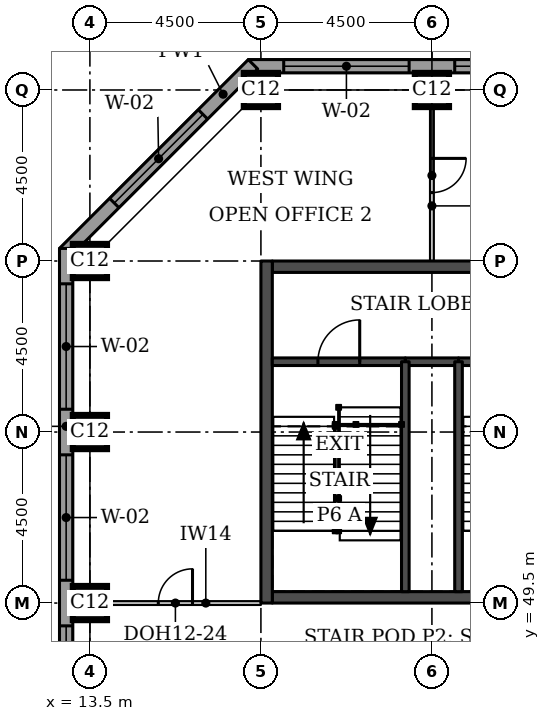
"""IFC4 building model, lengths in metres.
Left out: names, types, materials, properties, quantities, classifications, styles, units other than length and angle.
Written with IfcOpenShell. Run it as: python <this file> out.ifc"""

import sys

from ifc_helpers import new_model, si_unit, direction, frame, frame_2d, origin, origin_2d, place, context, subcontext, project, spatial, rectangle, extrude, element, fill, save


model = new_model("IFC4")
c1 = context("Model", 3, precision=1e-05, world=origin(), true_north=direction((0.0, 1.0)))
c2 = subcontext(c1, "Body", "Model", "MODEL_VIEW")
j1 = project(units=[si_unit("LENGTHUNIT", "METRE"), si_unit("PLANEANGLEUNIT", "RADIAN")], contexts=[c1])
p1 = place(None, origin())
s1 = spatial("IfcSite", under=j1, at=p1, CompositionType="ELEMENT")
p2 = place(p1, origin())
s2 = spatial("IfcBuilding", under=s1, at=p2, CompositionType="ELEMENT")
p3 = place(p2, frame((0.0, 0.0, 252.6)))
s3 = spatial("IfcBuildingStorey", under=s2, at=p3, CompositionType="ELEMENT", Elevation=252.6)
for number, where, z_axis, x_axis in (
    (1, (13.5, 49.5, 0.0), (0.0, 0.0, 1.0), (1.0, 0.0, 0.0)),
    (2, (13.5, 54.0, 0.0), (0.0, 0.0, 1.0), (1.0, 0.0, 0.0)),
    (3, (13.5, 58.5, 0.0), (0.0, 0.0, 1.0), (1.0, 0.0, 0.0)),
    (4, (18.0, 63.0, 0.0), (0.0, 0.0, 1.0), (1.0, 0.0, 0.0)),
    (5, (22.5, 63.0, 0.0), (0.0, 0.0, 1.0), (1.0, 0.0, 0.0)),
):
    element("IfcColumn", number, at=place(p3, frame(where, z_axis=z_axis, x_axis=x_axis)), inside=s3, PredefinedType="COLUMN", context=c2, shape_type="SweptSolid", body=[
        extrude(rectangle(XDim=0.9, YDim=0.9, at=origin_2d()), origin(), (0.0, 0.0, 1.0), 3.7),
    ])
for number, where, z_axis, x_axis in (
    (6, (18.3, 49.65, 0.0), (0.0, 0.0, 1.0), (1.0, 0.0, 0.0)),
    (7, (18.3, 58.35, 0.0), (0.0, 0.0, 1.0), (1.0, 0.0, 0.0)),
):
    element("IfcWall", number, at=place(p3, frame(where, z_axis=z_axis, x_axis=x_axis)), inside=s3, PredefinedType="SHEAR", context=c2, shape_type="SweptSolid", body=[
        extrude(rectangle(XDim=8.4, YDim=0.3, at=frame_2d((4.2, 0.0))), origin(), (0.0, 0.0, 1.0), 3.7),
    ])
p4 = place(p3, frame((18.15, 49.5, 0.0), z_axis=(0.0, 0.0, 1.0), x_axis=(0.0, 1.0, 0.0)))
e8 = element("IfcWall", 8, at=p4, inside=s3, PredefinedType="SHEAR", context=c2, shape_type="SweptSolid", body=[
    extrude(rectangle(XDim=9.0, YDim=0.3, at=frame_2d((4.5, 0.0))), origin(), (0.0, 0.0, 1.0), 3.7),
])
p5 = place(p3, frame((35.55, 63.625, 0.0), z_axis=(0.0, 0.0, 1.0), x_axis=(-1.0, 0.0, 0.0)))
e9 = element("IfcWall", 9, at=p5, inside=s3, PredefinedType="STANDARD", context=c2, shape_type="SweptSolid", body=[
    extrude(rectangle(XDim=17.881, YDim=0.35, at=frame_2d((8.941, 0.0))), origin(), (0.0, 0.0, 1.0), 3.525),
])
p6 = place(p5, frame((0.5, 0.0, 0.9)))
e10 = element("IfcOpeningElement", 10, at=p6, cuts=e9, PredefinedType="OPENING", context=c2, shape_type="SweptSolid", body=[
    extrude(rectangle(XDim=3.3, YDim=1.9, at=frame_2d((1.65, 0.95))), frame((0.0, 0.185, 0.0), z_axis=(0.0, -1.0, 0.0), x_axis=(1.0, 0.0, 0.0)), (0.0, 0.0, 1.0), 0.37),
])
p7 = place(p5, frame((4.65, 0.0, 0.9)))
e11 = element("IfcOpeningElement", 11, at=p7, cuts=e9, PredefinedType="OPENING", context=c2, shape_type="SweptSolid", body=[
    extrude(rectangle(XDim=3.3, YDim=1.9, at=frame_2d((1.65, 0.95))), frame((0.0, 0.185, 0.0), z_axis=(0.0, -1.0, 0.0), x_axis=(1.0, 0.0, 0.0)), (0.0, 0.0, 1.0), 0.37),
])
p8 = place(p5, frame((9.15, 0.0, 0.9)))
e12 = element("IfcOpeningElement", 12, at=p8, cuts=e9, PredefinedType="OPENING", context=c2, shape_type="SweptSolid", body=[
    extrude(rectangle(XDim=3.3, YDim=1.9, at=frame_2d((1.65, 0.95))), frame((0.0, 0.185, 0.0), z_axis=(0.0, -1.0, 0.0), x_axis=(1.0, 0.0, 0.0)), (0.0, 0.0, 1.0), 0.37),
])
p9 = place(p5, frame((13.65, 0.0, 0.9)))
e13 = element("IfcOpeningElement", 13, at=p9, cuts=e9, PredefinedType="OPENING", context=c2, shape_type="SweptSolid", body=[
    extrude(rectangle(XDim=3.3, YDim=1.9, at=frame_2d((1.65, 0.95))), frame((0.0, 0.185, 0.0), z_axis=(0.0, -1.0, 0.0), x_axis=(1.0, 0.0, 0.0)), (0.0, 0.0, 1.0), 0.37),
])
p10 = place(p3, frame((17.792, 63.676, 0.0), z_axis=(0.0, 0.0, 1.0), x_axis=(-0.707106781187, -0.707106781187, 0.0)))
e14 = element("IfcWall", 14, at=p10, inside=s3, PredefinedType="STANDARD", context=c2, shape_type="SweptSolid", body=[
    extrude(rectangle(XDim=7.027, YDim=0.35, at=frame_2d((3.513, 0.0))), origin(), (0.0, 0.0, 1.0), 3.525),
])
p11 = place(p10, frame((1.863, 0.0, 0.9)))
e15 = element("IfcOpeningElement", 15, at=p11, cuts=e14, PredefinedType="OPENING", context=c2, shape_type="SweptSolid", body=[
    extrude(rectangle(XDim=3.3, YDim=1.9, at=frame_2d((1.65, 0.95))), frame((0.0, 0.185, 0.0), z_axis=(0.0, -1.0, 0.0), x_axis=(1.0, 0.0, 0.0)), (0.0, 0.0, 1.0), 0.37),
])
p12 = place(p3, frame((12.875, 58.831, 0.0), z_axis=(0.0, 0.0, 1.0), x_axis=(0.0, -1.0, 0.0)))
e16 = element("IfcWall", 16, at=p12, inside=s3, PredefinedType="STANDARD", context=c2, shape_type="SweptSolid", body=[
    extrude(rectangle(XDim=14.163, YDim=0.35, at=frame_2d((7.081, 0.0))), origin(), (0.0, 0.0, 1.0), 3.525),
])
p13 = place(p12, frame((0.931, 0.0, 0.9)))
e17 = element("IfcOpeningElement", 17, at=p13, cuts=e16, PredefinedType="OPENING", context=c2, shape_type="SweptSolid", body=[
    extrude(rectangle(XDim=3.3, YDim=1.9, at=frame_2d((1.65, 0.95))), frame((0.0, 0.185, 0.0), z_axis=(0.0, -1.0, 0.0), x_axis=(1.0, 0.0, 0.0)), (0.0, 0.0, 1.0), 0.37),
])
p14 = place(p12, frame((5.431, 0.0, 0.9)))
e18 = element("IfcOpeningElement", 18, at=p14, cuts=e16, PredefinedType="OPENING", context=c2, shape_type="SweptSolid", body=[
    extrude(rectangle(XDim=3.3, YDim=1.9, at=frame_2d((1.65, 0.95))), frame((0.0, 0.185, 0.0), z_axis=(0.0, -1.0, 0.0), x_axis=(1.0, 0.0, 0.0)), (0.0, 0.0, 1.0), 0.37),
])
p15 = place(p12, frame((9.931, 0.0, 0.9)))
e19 = element("IfcOpeningElement", 19, at=p15, cuts=e16, PredefinedType="OPENING", context=c2, shape_type="SweptSolid", body=[
    extrude(rectangle(XDim=3.3, YDim=1.9, at=frame_2d((1.65, 0.95))), frame((0.0, 0.185, 0.0), z_axis=(0.0, -1.0, 0.0), x_axis=(1.0, 0.0, 0.0)), (0.0, 0.0, 1.0), 0.37),
])
p16 = place(p3, frame((22.5, 63.0, 0.0), z_axis=(0.0, 0.0, 1.0), x_axis=(0.0, -1.0, 0.0)))
e20 = element("IfcWall", 20, at=p16, inside=s3, PredefinedType="PARTITIONING", context=c2, shape_type="SweptSolid", body=[
    extrude(rectangle(XDim=4.5, YDim=0.1, at=frame_2d((2.25, 0.0))), origin(), (0.0, 0.0, 1.0), 3.55),
])
p17 = place(p16, frame((1.8, 0.0, 0.0)))
e21 = element("IfcOpeningElement", 21, at=p17, cuts=e20, PredefinedType="OPENING", context=c2, shape_type="SweptSolid", body=[
    extrude(rectangle(XDim=0.9, YDim=2.1, at=frame_2d((0.45, 1.05))), frame((0.0, 0.06, 0.0), z_axis=(0.0, -1.0, 0.0), x_axis=(1.0, 0.0, 0.0)), (0.0, 0.0, 1.0), 0.12),
])
p18 = place(p3, frame((13.5, 49.5, 0.0), z_axis=(0.0, 0.0, 1.0), x_axis=(1.0, 0.0, 0.0)))
e22 = element("IfcWall", 22, at=p18, inside=s3, PredefinedType="PARTITIONING", context=c2, shape_type="SweptSolid", body=[
    extrude(rectangle(XDim=4.5, YDim=0.1, at=frame_2d((2.25, 0.0))), origin(), (0.0, 0.0, 1.0), 3.55),
])
p19 = place(p18, frame((1.8, 0.0, 0.0)))
e23 = element("IfcOpeningElement", 23, at=p19, cuts=e22, PredefinedType="OPENING", context=c2, shape_type="SweptSolid", body=[
    extrude(rectangle(XDim=0.9, YDim=2.1, at=frame_2d((0.45, 1.05))), frame((0.0, 0.06, 0.0), z_axis=(0.0, -1.0, 0.0), x_axis=(1.0, 0.0, 0.0)), (0.0, 0.0, 1.0), 0.12),
])
p20 = place(p3, frame((21.8, 55.85, 0.0), z_axis=(0.0, 0.0, 1.0), x_axis=(1.0, 0.0, 0.0)))
e24 = element("IfcWall", 24, at=p20, inside=s3, PredefinedType="SOLIDWALL", context=c2, shape_type="SweptSolid", body=[
    extrude(rectangle(XDim=1.4, YDim=0.2, at=frame_2d((0.7, 0.0))), origin(), (0.0, 0.0, 1.0), 3.55),
])
p21 = place(p3, frame((18.3, 55.85, 0.0), z_axis=(0.0, 0.0, 1.0), x_axis=(1.0, 0.0, 0.0)))
e25 = element("IfcWall", 25, at=p21, inside=s3, PredefinedType="SOLIDWALL", context=c2, shape_type="SweptSolid", body=[
    extrude(rectangle(XDim=3.5, YDim=0.2, at=frame_2d((1.75, 0.0))), origin(), (0.0, 0.0, 1.0), 3.55),
])
p22 = place(p21, frame((1.2, 0.0, 0.0)))
e26 = element("IfcOpeningElement", 26, at=p22, cuts=e25, PredefinedType="OPENING", context=c2, shape_type="SweptSolid", body=[
    extrude(rectangle(XDim=1.1, YDim=2.1, at=frame_2d((0.55, 1.05))), frame((0.0, 0.11, 0.0), z_axis=(0.0, -1.0, 0.0), x_axis=(1.0, 0.0, 0.0)), (0.0, 0.0, 1.0), 0.22),
])
p23 = place(p3, frame((23.2, 55.85, 0.0), z_axis=(0.0, 0.0, 1.0), x_axis=(1.0, 0.0, 0.0)))
e27 = element("IfcWall", 27, at=p23, inside=s3, PredefinedType="SOLIDWALL", context=c2, shape_type="SweptSolid", body=[
    extrude(rectangle(XDim=3.5, YDim=0.2, at=frame_2d((1.75, 0.0))), origin(), (0.0, 0.0, 1.0), 3.55),
])
p24 = place(p23, frame((1.2, 0.0, 0.0)))
e28 = element("IfcOpeningElement", 28, at=p24, cuts=e27, PredefinedType="OPENING", context=c2, shape_type="SweptSolid", body=[
    extrude(rectangle(XDim=1.1, YDim=2.1, at=frame_2d((0.55, 1.05))), frame((0.0, 0.11, 0.0), z_axis=(0.0, -1.0, 0.0), x_axis=(1.0, 0.0, 0.0)), (0.0, 0.0, 1.0), 0.22),
])
for number, where, z_axis, x_axis in (
    (29, (21.8, 49.8, 0.0), (0.0, 0.0, 1.0), (0.0, 1.0, 0.0)),
    (30, (23.2, 49.8, 0.0), (0.0, 0.0, 1.0), (0.0, 1.0, 0.0)),
):
    element("IfcWall", number, at=place(p3, frame(where, z_axis=z_axis, x_axis=x_axis)), inside=s3, PredefinedType="SOLIDWALL", context=c2, shape_type="SweptSolid", body=[
        extrude(rectangle(XDim=6.05, YDim=0.2, at=frame_2d((3.025, 0.0))), origin(), (0.0, 0.0, 1.0), 3.55),
    ])
p25 = place(p8, origin())
e31 = element("IfcWindow", 31, at=p25, inside=s3, PartitioningType="SINGLE_PANEL", PredefinedType="WINDOW", context=c2, shape_type="SweptSolid", body=[
    extrude(rectangle(XDim=3.3, YDim=1.9, at=frame_2d((1.65, 0.95))), frame((0.0, 0.085, 0.0), z_axis=(0.0, -1.0, 0.0), x_axis=(1.0, 0.0, 0.0)), (0.0, 0.0, 1.0), 0.06),
])
fill(e12, e31)
p26 = place(p9, origin())
e32 = element("IfcWindow", 32, at=p26, inside=s3, PartitioningType="SINGLE_PANEL", PredefinedType="WINDOW", context=c2, shape_type="SweptSolid", body=[
    extrude(rectangle(XDim=3.3, YDim=1.9, at=frame_2d((1.65, 0.95))), frame((0.0, 0.085, 0.0), z_axis=(0.0, -1.0, 0.0), x_axis=(1.0, 0.0, 0.0)), (0.0, 0.0, 1.0), 0.06),
])
fill(e13, e32)
p27 = place(p11, origin())
e33 = element("IfcWindow", 33, at=p27, inside=s3, PartitioningType="SINGLE_PANEL", PredefinedType="WINDOW", context=c2, shape_type="SweptSolid", body=[
    extrude(rectangle(XDim=3.3, YDim=1.9, at=frame_2d((1.65, 0.95))), frame((0.0, 0.085, 0.0), z_axis=(0.0, -1.0, 0.0), x_axis=(1.0, 0.0, 0.0)), (0.0, 0.0, 1.0), 0.06),
])
fill(e15, e33)
p28 = place(p13, origin())
e34 = element("IfcWindow", 34, at=p28, inside=s3, PartitioningType="SINGLE_PANEL", PredefinedType="WINDOW", context=c2, shape_type="SweptSolid", body=[
    extrude(rectangle(XDim=3.3, YDim=1.9, at=frame_2d((1.65, 0.95))), frame((0.0, 0.085, 0.0), z_axis=(0.0, -1.0, 0.0), x_axis=(1.0, 0.0, 0.0)), (0.0, 0.0, 1.0), 0.06),
])
fill(e17, e34)
p29 = place(p14, origin())
e35 = element("IfcWindow", 35, at=p29, inside=s3, PartitioningType="SINGLE_PANEL", PredefinedType="WINDOW", context=c2, shape_type="SweptSolid", body=[
    extrude(rectangle(XDim=3.3, YDim=1.9, at=frame_2d((1.65, 0.95))), frame((0.0, 0.085, 0.0), z_axis=(0.0, -1.0, 0.0), x_axis=(1.0, 0.0, 0.0)), (0.0, 0.0, 1.0), 0.06),
])
fill(e18, e35)
p30 = place(p15, origin())
e36 = element("IfcWindow", 36, at=p30, inside=s3, PartitioningType="SINGLE_PANEL", PredefinedType="WINDOW", context=c2, shape_type="SweptSolid", body=[
    extrude(rectangle(XDim=3.3, YDim=1.9, at=frame_2d((1.65, 0.95))), frame((0.0, 0.085, 0.0), z_axis=(0.0, -1.0, 0.0), x_axis=(1.0, 0.0, 0.0)), (0.0, 0.0, 1.0), 0.06),
])
fill(e19, e36)
p31 = place(p17, origin())
e37 = element("IfcDoor", 37, at=p31, inside=s3, OperationType="SINGLE_SWING_LEFT", PredefinedType="DOOR", context=c2, shape_type="SweptSolid", body=[
    extrude(rectangle(XDim=0.9, YDim=2.1, at=frame_2d((0.45, 1.05))), frame((0.0, 0.025, 0.0), z_axis=(0.0, -1.0, 0.0), x_axis=(1.0, 0.0, 0.0)), (0.0, 0.0, 1.0), 0.05),
])
fill(e21, e37)
p32 = place(p19, origin())
e38 = element("IfcDoor", 38, at=p32, inside=s3, OperationType="SINGLE_SWING_RIGHT", PredefinedType="DOOR", context=c2, shape_type="SweptSolid", body=[
    extrude(rectangle(XDim=0.9, YDim=2.1, at=frame_2d((0.45, 1.05))), frame((0.0, 0.025, 0.0), z_axis=(0.0, -1.0, 0.0), x_axis=(1.0, 0.0, 0.0)), (0.0, 0.0, 1.0), 0.05),
])
fill(e23, e38)
p33 = place(p22, origin())
e39 = element("IfcDoor", 39, at=p33, inside=s3, OperationType="SINGLE_SWING_RIGHT", PredefinedType="DOOR", context=c2, shape_type="SweptSolid", body=[
    extrude(rectangle(XDim=1.1, YDim=2.1, at=frame_2d((0.55, 1.05))), frame((0.0, 0.025, 0.0), z_axis=(0.0, -1.0, 0.0), x_axis=(1.0, 0.0, 0.0)), (0.0, 0.0, 1.0), 0.05),
])
fill(e26, e39)
save(model, sys.argv[1])
